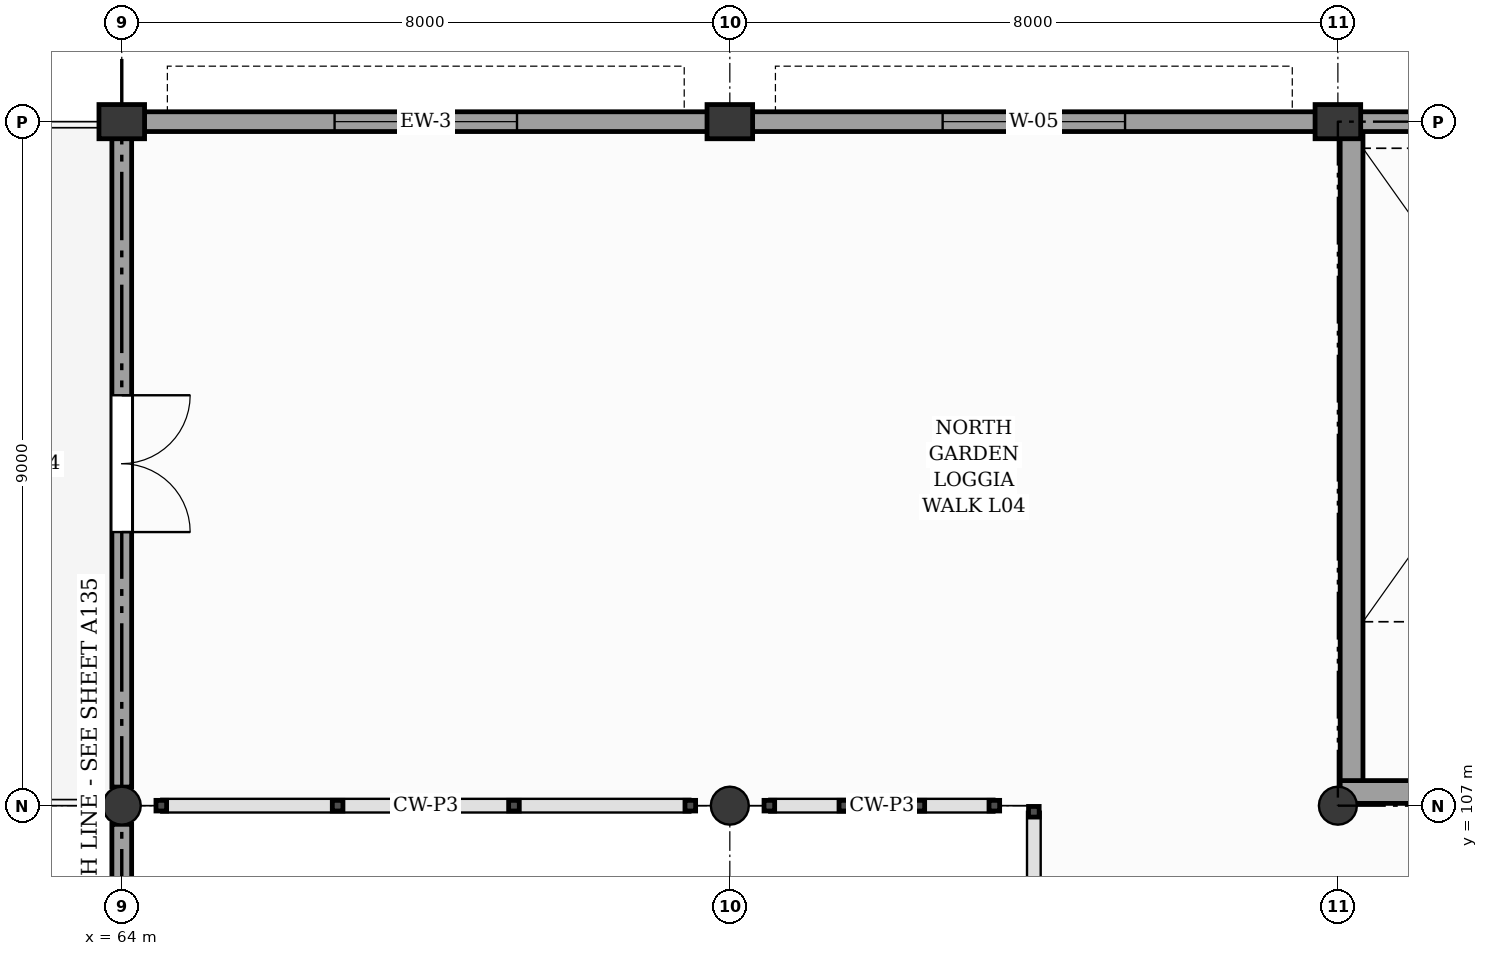
"""IFC4 building model, lengths in metres.
Left out: names, types, materials, properties, quantities, classifications, styles, units other than length and angle.
Written with IfcOpenShell. Run it as: python <this file> out.ifc"""

import sys

from ifc_helpers import new_model, si_unit, direction, frame, frame_2d, origin, origin_2d, place, context, subcontext, project, spatial, rectangle, circle, extrude, element, fill, save


model = new_model("IFC4")
c1 = context("Model", 3, precision=1e-05, world=origin(), true_north=direction((0.0, 1.0)))
c2 = subcontext(c1, "Body", "Model", "MODEL_VIEW")
j1 = project(units=[si_unit("LENGTHUNIT", "METRE"), si_unit("PLANEANGLEUNIT", "RADIAN")], contexts=[c1])
p1 = place(None, origin())
s1 = spatial("IfcSite", under=j1, at=p1, CompositionType="ELEMENT")
p2 = place(p1, origin())
s2 = spatial("IfcBuilding", under=s1, at=p2, CompositionType="ELEMENT")
p3 = place(p2, frame((0.0, 0.0, 20.4)))
s3 = spatial("IfcBuildingStorey", under=s2, at=p3, CompositionType="ELEMENT", Elevation=20.4)
p4 = place(p3, frame((64.0, 107.0, 0.0), z_axis=(0.0, 0.0, 1.0), x_axis=(1.0, 0.0, 0.0)))
e1 = element("IfcColumn", 1, at=p4, inside=s3, PredefinedType="COLUMN", context=c2, shape_type="SweptSolid", body=[
    extrude(circle(Radius=0.25, at=origin_2d()), origin(), (0.0, 0.0, 1.0), 4.2),
])
p5 = place(p3, frame((64.0, 116.0, 0.0), z_axis=(0.0, 0.0, 1.0), x_axis=(1.0, 0.0, 0.0)))
e2 = element("IfcColumn", 2, at=p5, inside=s3, PredefinedType="PILASTER", context=c2, shape_type="SweptSolid", body=[
    extrude(rectangle(XDim=0.6, YDim=0.45, at=origin_2d()), origin(), (0.0, 0.0, 1.0), 4.2),
])
p6 = place(p3, frame((72.0, 107.0, 0.0), z_axis=(0.0, 0.0, 1.0), x_axis=(1.0, 0.0, 0.0)))
e3 = element("IfcColumn", 3, at=p6, inside=s3, PredefinedType="COLUMN", context=c2, shape_type="SweptSolid", body=[
    extrude(circle(Radius=0.25, at=origin_2d()), origin(), (0.0, 0.0, 1.0), 4.2),
])
p7 = place(p3, frame((72.0, 116.0, 0.0), z_axis=(0.0, 0.0, 1.0), x_axis=(1.0, 0.0, 0.0)))
e4 = element("IfcColumn", 4, at=p7, inside=s3, PredefinedType="PILASTER", context=c2, shape_type="SweptSolid", body=[
    extrude(rectangle(XDim=0.6, YDim=0.45, at=origin_2d()), origin(), (0.0, 0.0, 1.0), 4.2),
])
p8 = place(p3, frame((80.0, 107.0, 0.0), z_axis=(0.0, 0.0, 1.0), x_axis=(1.0, 0.0, 0.0)))
e5 = element("IfcColumn", 5, at=p8, inside=s3, PredefinedType="COLUMN", context=c2, shape_type="SweptSolid", body=[
    extrude(circle(Radius=0.25, at=origin_2d()), origin(), (0.0, 0.0, 1.0), 4.2),
])
p9 = place(p3, frame((80.0, 116.0, 0.0), z_axis=(0.0, 0.0, 1.0), x_axis=(1.0, 0.0, 0.0)))
e6 = element("IfcColumn", 6, at=p9, inside=s3, PredefinedType="PILASTER", context=c2, shape_type="SweptSolid", body=[
    extrude(rectangle(XDim=0.6, YDim=0.45, at=origin_2d()), origin(), (0.0, 0.0, 1.0), 4.2),
])
p10 = place(p3, frame((64.295, 116.0, 0.0), z_axis=(0.0, 0.0, 1.0), x_axis=(1.0, 0.0, 0.0)))
e7 = element("IfcWall", 7, at=p10, inside=s3, PredefinedType="SOLIDWALL", context=c2, shape_type="SweptSolid", body=[
    extrude(rectangle(XDim=7.41, YDim=0.26, at=frame_2d((3.705, 0.0))), origin(), (0.0, 0.0, 1.0), 3.21),
])
p11 = place(p10, frame((2.505, 0.0, 0.9)))
e8 = element("IfcOpeningElement", 8, at=p11, cuts=e7, PredefinedType="OPENING", context=c2, shape_type="SweptSolid", body=[
    extrude(rectangle(XDim=2.4, YDim=1.99, at=frame_2d((1.2, 0.995))), frame((0.0, 0.14, 0.0), z_axis=(0.0, -1.0, 0.0), x_axis=(1.0, 0.0, 0.0)), (0.0, 0.0, 1.0), 0.28),
])
p12 = place(p3, frame((72.295, 116.0, 0.0), z_axis=(0.0, 0.0, 1.0), x_axis=(1.0, 0.0, 0.0)))
e9 = element("IfcWall", 9, at=p12, inside=s3, PredefinedType="SOLIDWALL", context=c2, shape_type="SweptSolid", body=[
    extrude(rectangle(XDim=7.41, YDim=0.26, at=frame_2d((3.705, 0.0))), origin(), (0.0, 0.0, 1.0), 3.21),
])
p13 = place(p12, frame((2.505, 0.0, 0.9)))
e10 = element("IfcOpeningElement", 10, at=p13, cuts=e9, PredefinedType="OPENING", context=c2, shape_type="SweptSolid", body=[
    extrude(rectangle(XDim=2.4, YDim=1.99, at=frame_2d((1.2, 0.995))), frame((0.0, 0.14, 0.0), z_axis=(0.0, -1.0, 0.0), x_axis=(1.0, 0.0, 0.0)), (0.0, 0.0, 1.0), 0.28),
])
p14 = place(p3, frame((80.295, 116.0, 0.0), z_axis=(0.0, 0.0, 1.0), x_axis=(1.0, 0.0, 0.0)))
e11 = element("IfcWall", 11, at=p14, inside=s3, PredefinedType="SOLIDWALL", context=c2, shape_type="SweptSolid", body=[
    extrude(rectangle(XDim=7.41, YDim=0.26, at=frame_2d((3.705, 0.0))), origin(), (0.0, 0.0, 1.0), 3.21),
])
p15 = place(p3, frame((64.0, 98.4, 0.0), z_axis=(0.0, 0.0, 1.0), x_axis=(0.0, 1.0, 0.0)))
e12 = element("IfcWall", 12, at=p15, inside=s3, PredefinedType="SOLIDWALL", context=c2, shape_type="SweptSolid", body=[
    extrude(rectangle(XDim=8.355, YDim=0.26, at=frame_2d((4.177, 0.0))), origin(), (0.0, 0.0, 1.0), 3.21),
])
p16 = place(p15, frame((3.3, 0.0, 0.95)))
e13 = element("IfcOpeningElement", 13, at=p16, cuts=e12, PredefinedType="OPENING", context=c2, shape_type="SweptSolid", body=[
    extrude(rectangle(XDim=1.6, YDim=2.1, at=frame_2d((0.8, 1.05))), frame((0.0, 0.14, 0.0), z_axis=(0.0, -1.0, 0.0), x_axis=(1.0, 0.0, 0.0)), (0.0, 0.0, 1.0), 0.28),
])
p17 = place(p3, frame((64.0, 107.245, 0.0), z_axis=(0.0, 0.0, 1.0), x_axis=(0.0, 1.0, 0.0)))
e14 = element("IfcWall", 14, at=p17, inside=s3, PredefinedType="SOLIDWALL", context=c2, shape_type="SweptSolid", body=[
    extrude(rectangle(XDim=8.535, YDim=0.26, at=frame_2d((4.268, 0.0))), origin(), (0.0, 0.0, 1.0), 3.21),
])
p18 = place(p17, frame((3.355, 0.0, 0.0)))
e15 = element("IfcOpeningElement", 15, at=p18, cuts=e14, PredefinedType="OPENING", context=c2, shape_type="SweptSolid", body=[
    extrude(rectangle(XDim=1.8, YDim=2.2, at=frame_2d((0.9, 1.1))), frame((0.0, 0.14, 0.0), z_axis=(0.0, -1.0, 0.0), x_axis=(1.0, 0.0, 0.0)), (0.0, 0.0, 1.0), 0.28),
])
p19 = place(p3, frame((80.18, 107.18, 0.0), z_axis=(0.0, 0.0, 1.0), x_axis=(0.0, 1.0, 0.0)))
e16 = element("IfcWall", 16, at=p19, inside=s3, PredefinedType="SHEAR", context=c2, shape_type="SweptSolid", body=[
    extrude(rectangle(XDim=8.64, YDim=0.3, at=frame_2d((4.32, 0.0))), origin(), (0.0, 0.0, 1.0), 3.98),
])
p20 = place(p3, frame((80.03, 107.18, 0.0), z_axis=(0.0, 0.0, 1.0), x_axis=(1.0, 0.0, 0.0)))
e17 = element("IfcWall", 17, at=p20, inside=s3, PredefinedType="SHEAR", context=c2, shape_type="SweptSolid", body=[
    extrude(rectangle(XDim=7.94, YDim=0.3, at=frame_2d((3.97, 0.0))), origin(), (0.0, 0.0, 1.0), 3.98),
])
p21 = place(p20, frame((5.35, 0.0, 0.0)))
e18 = element("IfcOpeningElement", 18, at=p21, cuts=e17, PredefinedType="OPENING", context=c2, shape_type="SweptSolid", body=[
    extrude(rectangle(XDim=1.6, YDim=2.15, at=frame_2d((0.8, 1.075))), frame((0.0, 0.16, 0.0), z_axis=(0.0, -1.0, 0.0), x_axis=(1.0, 0.0, 0.0)), (0.0, 0.0, 1.0), 0.32),
])
p22 = place(p11, origin())
e19 = element("IfcWindow", 19, at=p22, inside=s3, PartitioningType="SINGLE_PANEL", PredefinedType="WINDOW", context=c2, shape_type="SweptSolid", body=[
    extrude(rectangle(XDim=2.4, YDim=1.99, at=frame_2d((1.2, 0.995))), frame((0.0, 0.03, 0.0), z_axis=(0.0, -1.0, 0.0), x_axis=(1.0, 0.0, 0.0)), (0.0, 0.0, 1.0), 0.06),
])
fill(e8, e19)
p23 = place(p13, origin())
e20 = element("IfcWindow", 20, at=p23, inside=s3, PartitioningType="SINGLE_PANEL", PredefinedType="WINDOW", context=c2, shape_type="SweptSolid", body=[
    extrude(rectangle(XDim=2.4, YDim=1.99, at=frame_2d((1.2, 0.995))), frame((0.0, 0.03, 0.0), z_axis=(0.0, -1.0, 0.0), x_axis=(1.0, 0.0, 0.0)), (0.0, 0.0, 1.0), 0.06),
])
fill(e10, e20)
p24 = place(p18, frame((1.8, 0.0, 0.0), z_axis=(0.0, 0.0, 1.0), x_axis=(-1.0, 0.0, 0.0)))
e21 = element("IfcDoor", 21, at=p24, inside=s3, OperationType="DOUBLE_DOOR_SINGLE_SWING", PredefinedType="DOOR", context=c2, shape_type="SweptSolid", body=[
    extrude(rectangle(XDim=1.8, YDim=2.2, at=frame_2d((0.9, 1.1))), frame((0.0, 0.025, 0.0), z_axis=(0.0, -1.0, 0.0), x_axis=(1.0, 0.0, 0.0)), (0.0, 0.0, 1.0), 0.05),
])
fill(e15, e21)
save(model, sys.argv[1])
